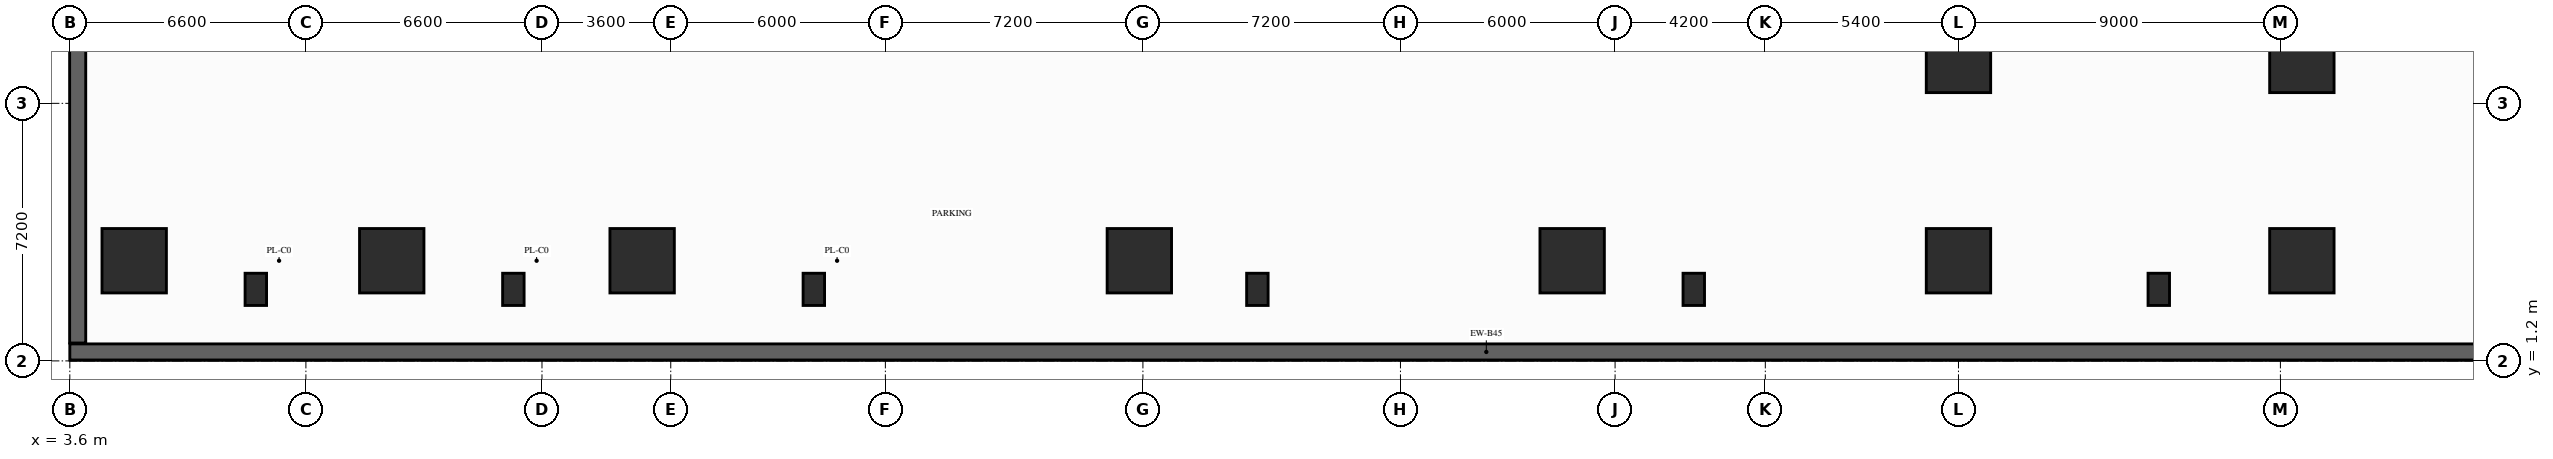
"""IFC4 building model, lengths in metres.
Left out: names, types, materials, properties, quantities, classifications, styles, units other than length and angle.
Written with IfcOpenShell. Run it as: python <this file> out.ifc"""

import sys

from ifc_helpers import new_model, si_unit, direction, frame, frame_2d, origin, origin_2d, place, context, subcontext, project, spatial, rectangle, extrude, element, save


model = new_model("IFC4")
c1 = context("Model", 3, precision=1e-05, world=origin(), true_north=direction((0.0, 1.0)))
c2 = subcontext(c1, "Body", "Model", "MODEL_VIEW")
j1 = project(units=[si_unit("LENGTHUNIT", "METRE"), si_unit("PLANEANGLEUNIT", "RADIAN")], contexts=[c1])
p1 = place(None, origin())
s1 = spatial("IfcSite", under=j1, at=p1, CompositionType="ELEMENT")
p2 = place(p1, origin())
s2 = spatial("IfcBuilding", under=s1, at=p2, CompositionType="ELEMENT")
p3 = place(p2, frame((0.0, 0.0, -7.6)))
s3 = spatial("IfcBuildingStorey", under=s2, at=p3, CompositionType="ELEMENT", Elevation=-7.6)
for number, where, z_axis, x_axis in (
    (1, (56.4, 9.6, 0.0), (0.0, 0.0, 1.0), (1.0, 0.0, 0.0)),
    (2, (66.0, 9.6, 0.0), (0.0, 0.0, 1.0), (1.0, 0.0, 0.0)),
    (3, (5.4, 4.0, 0.0), (0.0, 0.0, 1.0), (1.0, 0.0, 0.0)),
    (4, (12.6, 4.0, 0.0), (0.0, 0.0, 1.0), (1.0, 0.0, 0.0)),
    (5, (19.6, 4.0, 0.0), (0.0, 0.0, 1.0), (1.0, 0.0, 0.0)),
    (6, (33.5, 4.0, 0.0), (0.0, 0.0, 1.0), (1.0, 0.0, 0.0)),
    (7, (45.6, 4.0, 0.0), (0.0, 0.0, 1.0), (1.0, 0.0, 0.0)),
    (8, (56.4, 4.0, 0.0), (0.0, 0.0, 1.0), (1.0, 0.0, 0.0)),
    (9, (66.0, 4.0, 0.0), (0.0, 0.0, 1.0), (1.0, 0.0, 0.0)),
):
    element("IfcColumn", number, at=place(p3, frame(where, z_axis=z_axis, x_axis=x_axis)), inside=s3, PredefinedType="COLUMN", context=c2, shape_type="SweptSolid", body=[
        extrude(rectangle(XDim=1.8, YDim=1.8, at=origin_2d()), origin(), (0.0, 0.0, 1.0), 3.8),
    ])
for number, where, z_axis, x_axis in (
    (10, (8.8, 3.2, 0.0), (0.0, 0.0, 1.0), (1.0, 0.0, 0.0)),
    (11, (16.0, 3.2, 0.0), (0.0, 0.0, 1.0), (1.0, 0.0, 0.0)),
    (12, (24.4, 3.2, 0.0), (0.0, 0.0, 1.0), (1.0, 0.0, 0.0)),
    (13, (36.8, 3.2, 0.0), (0.0, 0.0, 1.0), (1.0, 0.0, 0.0)),
    (14, (49.0, 3.2, 0.0), (0.0, 0.0, 1.0), (1.0, 0.0, 0.0)),
    (15, (62.0, 3.2, 0.0), (0.0, 0.0, 1.0), (1.0, 0.0, 0.0)),
):
    element("IfcColumn", number, at=place(p3, frame(where, z_axis=z_axis, x_axis=x_axis)), inside=s3, PredefinedType="PILASTER", context=c2, shape_type="SweptSolid", body=[
        extrude(rectangle(XDim=0.6, YDim=0.9, at=origin_2d()), origin(), (0.0, 0.0, 1.0), 3.8),
    ])
p4 = place(p3, frame((3.6, 1.45, 0.0), z_axis=(0.0, 0.0, 1.0), x_axis=(1.0, 0.0, 0.0)))
e16 = element("IfcWall", 16, at=p4, inside=s3, PredefinedType="SOLIDWALL", context=c2, shape_type="SweptSolid", body=[
    extrude(rectangle(XDim=79.2, YDim=0.45, at=frame_2d((39.6, 0.0))), origin(), (0.0, 0.0, 1.0), 3.55),
])
p5 = place(p3, frame((3.82, 49.9, 0.0), z_axis=(0.0, 0.0, 1.0), x_axis=(0.0, -1.0, 0.0)))
e17 = element("IfcWall", 17, at=p5, inside=s3, PredefinedType="SOLIDWALL", context=c2, shape_type="SweptSolid", body=[
    extrude(rectangle(XDim=48.2, YDim=0.45, at=frame_2d((24.1, 0.0))), origin(), (0.0, 0.0, 1.0), 3.55),
])
save(model, sys.argv[1])
